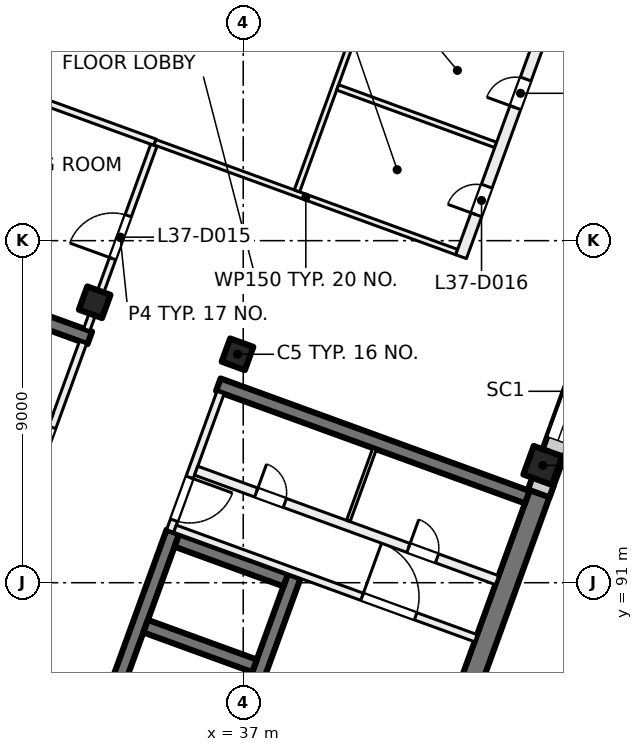
"""IFC4 building model, lengths in metres.
Left out: names, types, materials, properties, quantities, classifications, styles, units other than length and angle.
Written with IfcOpenShell. Run it as: python <this file> out.ifc"""

import sys

from ifc_helpers import new_model, si_unit, direction, frame, frame_2d, origin, origin_2d, place, context, subcontext, project, spatial, rectangle, extrude, element, fill, save


model = new_model("IFC4")
c1 = context("Model", 3, precision=1e-05, world=origin(), true_north=direction((0.0, 1.0)))
c2 = subcontext(c1, "Body", "Model", "MODEL_VIEW")
j1 = project(units=[si_unit("LENGTHUNIT", "METRE"), si_unit("PLANEANGLEUNIT", "RADIAN")], contexts=[c1])
p1 = place(None, origin())
s1 = spatial("IfcSite", under=j1, at=p1, CompositionType="ELEMENT")
p2 = place(p1, origin())
s2 = spatial("IfcBuilding", under=s1, at=p2, CompositionType="ELEMENT")
p3 = place(p2, frame((0.0, 0.0, 158.5)))
s3 = spatial("IfcBuildingStorey", under=s2, at=p3, CompositionType="ELEMENT", Elevation=158.5)
for number, where, z_axis, x_axis in (
    (1, (36.849, 97.011, 0.0), (0.0, 0.0, 1.0), (-0.342, -0.94, 0.0)),
    (2, (33.091, 98.379, 0.0), (0.0, 0.0, 1.0), (-0.342, -0.94, 0.0)),
):
    element("IfcColumn", number, at=place(p3, frame(where, z_axis=z_axis, x_axis=x_axis)), inside=s3, PredefinedType="COLUMN", context=c2, shape_type="SweptSolid", body=[
        extrude(rectangle(XDim=0.65, YDim=0.65, at=origin_2d()), origin(), (0.0, 0.0, 1.0), 4.0),
    ])
p4 = place(p3, frame((44.884, 94.087, 0.0), z_axis=(0.0, 0.0, 1.0), x_axis=(-0.342020143326, -0.939692620786, 0.0)))
e3 = element("IfcColumn", 3, at=p4, inside=s3, PredefinedType="COLUMN", context=c2, shape_type="SweptSolid", body=[
    extrude(rectangle(XDim=0.8, YDim=0.8, at=origin_2d()), origin(), (0.0, 0.0, 1.0), 4.0),
])
p5 = place(p3, frame((41.85, 85.241, 0.0), z_axis=(0.0, 0.0, 1.0), x_axis=(0.34201902012, 0.939693029598, 0.0)))
e4 = element("IfcWall", 4, at=p5, inside=s3, PredefinedType="SHEAR", context=c2, shape_type="SweptSolid", body=[
    extrude(rectangle(XDim=8.95, YDim=0.55, at=frame_2d((4.475, 0.0))), origin(), (0.0, 0.0, 1.0), 4.0),
])
p6 = place(p3, frame((30.967, 80.848, 0.0), z_axis=(0.0, 0.0, 1.0), x_axis=(0.34201563943, 0.939694260058, 0.0)))
e5 = element("IfcWall", 5, at=p6, inside=s3, PredefinedType="SHEAR", context=c2, shape_type="SweptSolid", body=[
    extrude(rectangle(XDim=12.225, YDim=0.35, at=frame_2d((6.113, 0.0))), origin(), (0.0, 0.0, 1.0), 4.0),
])
p7 = place(p6, frame((0.85, 0.0, 0.0)))
e6 = element("IfcOpeningElement", 6, at=p7, cuts=e5, PredefinedType="OPENING", context=c2, shape_type="SweptSolid", body=[
    extrude(rectangle(XDim=0.8, YDim=2.1, at=frame_2d((0.4, 1.05))), frame((0.0, 0.185, 0.0), z_axis=(0.0, -1.0, 0.0), x_axis=(1.0, 0.0, 0.0)), (0.0, 0.0, 1.0), 0.37),
])
p8 = place(p6, frame((5.65, 0.0, 0.0)))
e7 = element("IfcOpeningElement", 7, at=p8, cuts=e5, PredefinedType="OPENING", context=c2, shape_type="SweptSolid", body=[
    extrude(rectangle(XDim=0.8, YDim=2.1, at=frame_2d((0.4, 1.05))), frame((0.0, 0.185, 0.0), z_axis=(0.0, -1.0, 0.0), x_axis=(1.0, 0.0, 0.0)), (0.0, 0.0, 1.0), 0.37),
])
p9 = place(p3, frame((34.161, 79.685, 0.0), z_axis=(0.0, 0.0, 1.0), x_axis=(0.34201563943, 0.939694260058, 0.0)))
e8 = element("IfcWall", 8, at=p9, inside=s3, PredefinedType="SHEAR", context=c2, shape_type="SweptSolid", body=[
    extrude(rectangle(XDim=12.225, YDim=0.35, at=frame_2d((6.113, 0.0))), origin(), (0.0, 0.0, 1.0), 4.0),
])
for number, where, z_axis, x_axis in (
    (9, (37.298, 88.813, 0.0), (0.0, 0.0, 1.0), (-0.94, 0.342, 0.0)),
    (10, (38.118, 91.068, 0.0), (0.0, 0.0, 1.0), (-0.94, 0.342, 0.0)),
):
    element("IfcWall", number, at=place(p3, frame(where, z_axis=z_axis, x_axis=x_axis)), inside=s3, PredefinedType="SHEAR", context=c2, shape_type="SweptSolid", body=[
        extrude(rectangle(XDim=3.05, YDim=0.35, at=frame_2d((1.525, 0.0))), origin(), (0.0, 0.0, 1.0), 4.0),
    ])
p10 = place(p3, frame((44.473, 93.251, 0.0), z_axis=(0.0, 0.0, 1.0), x_axis=(-0.939692847377, 0.34201952077, 0.0)))
e11 = element("IfcWall", 11, at=p10, inside=s3, PredefinedType="SHEAR", context=c2, shape_type="SweptSolid", body=[
    extrude(rectangle(XDim=8.65, YDim=0.35, at=frame_2d((4.325, 0.0))), origin(), (0.0, 0.0, 1.0), 4.0),
])
p11 = place(p3, frame((32.962, 97.441, 0.0), z_axis=(0.0, 0.0, 1.0), x_axis=(-0.939689545667, 0.342028592028, 0.0)))
e12 = element("IfcWall", 12, at=p11, inside=s3, PredefinedType="SHEAR", context=c2, shape_type="SweptSolid", body=[
    extrude(rectangle(XDim=8.65, YDim=0.35, at=frame_2d((4.325, 0.0))), origin(), (0.0, 0.0, 1.0), 4.0),
])
p12 = place(p3, frame((52.212, 113.783, 0.0), z_axis=(0.0, 0.0, 1.0), x_axis=(-0.34202521188, -0.939690775968, 0.0)))
e13 = element("IfcWall", 13, at=p12, inside=s3, PredefinedType="SOLIDWALL", context=c2, shape_type="SweptSolid", body=[
    extrude(rectangle(XDim=21.745, YDim=0.6, at=frame_2d((10.873, 0.0))), origin(), (0.0, 0.0, 1.0), 3.625),
])
p13 = place(p12, frame((3.765, 0.0, 0.9)))
e14 = element("IfcOpeningElement", 14, at=p13, cuts=e13, PredefinedType="OPENING", context=c2, shape_type="SweptSolid", body=[
    extrude(rectangle(XDim=3.0, YDim=2.4, at=frame_2d((1.5, 1.2))), frame((0.0, 0.31, 0.0), z_axis=(0.0, -1.0, 0.0), x_axis=(1.0, 0.0, 0.0)), (0.0, 0.0, 1.0), 0.62),
])
p14 = place(p12, frame((8.265, 0.0, 0.9)))
e15 = element("IfcOpeningElement", 15, at=p14, cuts=e13, PredefinedType="OPENING", context=c2, shape_type="SweptSolid", body=[
    extrude(rectangle(XDim=3.0, YDim=2.4, at=frame_2d((1.5, 1.2))), frame((0.0, 0.31, 0.0), z_axis=(0.0, -1.0, 0.0), x_axis=(1.0, 0.0, 0.0)), (0.0, 0.0, 1.0), 0.62),
])
p15 = place(p12, frame((12.765, 0.0, 0.9)))
e16 = element("IfcOpeningElement", 16, at=p15, cuts=e13, PredefinedType="OPENING", context=c2, shape_type="SweptSolid", body=[
    extrude(rectangle(XDim=3.0, YDim=2.4, at=frame_2d((1.5, 1.2))), frame((0.0, 0.31, 0.0), z_axis=(0.0, -1.0, 0.0), x_axis=(1.0, 0.0, 0.0)), (0.0, 0.0, 1.0), 0.62),
])
p16 = place(p12, frame((17.265, 0.0, 0.9)))
e17 = element("IfcOpeningElement", 17, at=p16, cuts=e13, PredefinedType="OPENING", context=c2, shape_type="SweptSolid", body=[
    extrude(rectangle(XDim=3.0, YDim=2.4, at=frame_2d((1.5, 1.2))), frame((0.0, 0.31, 0.0), z_axis=(0.0, -1.0, 0.0), x_axis=(1.0, 0.0, 0.0)), (0.0, 0.0, 1.0), 0.62),
])
p17 = place(p3, frame((24.666, 100.669, 0.0), z_axis=(0.0, 0.0, 1.0), x_axis=(0.34201964167, 0.939692803373, 0.0)))
e18 = element("IfcWall", 18, at=p17, inside=s3, PredefinedType="SOLIDWALL", context=c2, shape_type="SweptSolid", body=[
    extrude(rectangle(XDim=32.884, YDim=0.6, at=frame_2d((16.442, 0.0))), origin(), (0.0, 0.0, 1.0), 3.625),
])
p18 = place(p17, frame((1.48, 0.0, 0.9)))
e19 = element("IfcOpeningElement", 19, at=p18, cuts=e18, PredefinedType="OPENING", context=c2, shape_type="SweptSolid", body=[
    extrude(rectangle(XDim=3.0, YDim=2.4, at=frame_2d((1.5, 1.2))), frame((0.0, 0.31, 0.0), z_axis=(0.0, -1.0, 0.0), x_axis=(1.0, 0.0, 0.0)), (0.0, 0.0, 1.0), 0.62),
])
p19 = place(p17, frame((5.98, 0.0, 0.9)))
e20 = element("IfcOpeningElement", 20, at=p19, cuts=e18, PredefinedType="OPENING", context=c2, shape_type="SweptSolid", body=[
    extrude(rectangle(XDim=3.0, YDim=2.4, at=frame_2d((1.5, 1.2))), frame((0.0, 0.31, 0.0), z_axis=(0.0, -1.0, 0.0), x_axis=(1.0, 0.0, 0.0)), (0.0, 0.0, 1.0), 0.62),
])
p20 = place(p17, frame((10.48, 0.0, 0.9)))
e21 = element("IfcOpeningElement", 21, at=p20, cuts=e18, PredefinedType="OPENING", context=c2, shape_type="SweptSolid", body=[
    extrude(rectangle(XDim=3.0, YDim=2.4, at=frame_2d((1.5, 1.2))), frame((0.0, 0.31, 0.0), z_axis=(0.0, -1.0, 0.0), x_axis=(1.0, 0.0, 0.0)), (0.0, 0.0, 1.0), 0.62),
])
p21 = place(p17, frame((14.98, 0.0, 0.9)))
e22 = element("IfcOpeningElement", 22, at=p21, cuts=e18, PredefinedType="OPENING", context=c2, shape_type="SweptSolid", body=[
    extrude(rectangle(XDim=3.0, YDim=2.4, at=frame_2d((1.5, 1.2))), frame((0.0, 0.31, 0.0), z_axis=(0.0, -1.0, 0.0), x_axis=(1.0, 0.0, 0.0)), (0.0, 0.0, 1.0), 0.62),
])
p22 = place(p17, frame((19.48, 0.0, 0.9)))
e23 = element("IfcOpeningElement", 23, at=p22, cuts=e18, PredefinedType="OPENING", context=c2, shape_type="SweptSolid", body=[
    extrude(rectangle(XDim=3.0, YDim=2.4, at=frame_2d((1.5, 1.2))), frame((0.0, 0.31, 0.0), z_axis=(0.0, -1.0, 0.0), x_axis=(1.0, 0.0, 0.0)), (0.0, 0.0, 1.0), 0.62),
])
p23 = place(p17, frame((23.98, 0.0, 0.9)))
e24 = element("IfcOpeningElement", 24, at=p23, cuts=e18, PredefinedType="OPENING", context=c2, shape_type="SweptSolid", body=[
    extrude(rectangle(XDim=3.0, YDim=2.4, at=frame_2d((1.5, 1.2))), frame((0.0, 0.31, 0.0), z_axis=(0.0, -1.0, 0.0), x_axis=(1.0, 0.0, 0.0)), (0.0, 0.0, 1.0), 0.62),
])
p24 = place(p17, frame((28.48, 0.0, 0.9)))
e25 = element("IfcOpeningElement", 25, at=p24, cuts=e18, PredefinedType="OPENING", context=c2, shape_type="SweptSolid", body=[
    extrude(rectangle(XDim=3.0, YDim=2.4, at=frame_2d((1.5, 1.2))), frame((0.0, 0.31, 0.0), z_axis=(0.0, -1.0, 0.0), x_axis=(1.0, 0.0, 0.0)), (0.0, 0.0, 1.0), 0.62),
])
p25 = place(p3, frame((31.459, 93.678, 0.0), z_axis=(0.0, 0.0, 1.0), x_axis=(0.341985870128, 0.939705094502, 0.0)))
e26 = element("IfcWall", 26, at=p25, inside=s3, PredefinedType="PARTITIONING", context=c2, shape_type="SweptSolid", body=[
    extrude(rectangle(XDim=3.875, YDim=0.2, at=frame_2d((1.938, 0.0))), origin(), (0.0, 0.0, 1.0), 3.625),
])
p26 = place(p25, frame((0.3, 0.0, 0.0)))
e27 = element("IfcOpeningElement", 27, at=p26, cuts=e26, PredefinedType="OPENING", context=c2, shape_type="SweptSolid", body=[
    extrude(rectangle(XDim=1.2, YDim=2.1, at=frame_2d((0.6, 1.05))), frame((0.0, 0.11, 0.0), z_axis=(0.0, -1.0, 0.0), x_axis=(1.0, 0.0, 0.0)), (0.0, 0.0, 1.0), 0.22),
])
p27 = place(p3, frame((24.039, 98.215, 0.0), z_axis=(0.0, 0.0, 1.0), x_axis=(0.939687617333, -0.342033889887, 0.0)))
e28 = element("IfcWall", 28, at=p27, inside=s3, PredefinedType="PARTITIONING", context=c2, shape_type="SweptSolid", body=[
    extrude(rectangle(XDim=8.425, YDim=0.25, at=frame_2d((4.212, 0.0))), origin(), (0.0, 0.0, 1.0), 3.625),
])
p28 = place(p27, frame((5.242, 0.0, 0.0)))
e29 = element("IfcOpeningElement", 29, at=p28, cuts=e28, PredefinedType="OPENING", context=c2, shape_type="SweptSolid", body=[
    extrude(rectangle(XDim=0.8, YDim=2.1, at=frame_2d((0.4, 1.05))), frame((0.0, 0.135, 0.0), z_axis=(0.0, -1.0, 0.0), x_axis=(1.0, 0.0, 0.0)), (0.0, 0.0, 1.0), 0.27),
])
p29 = place(p27, frame((0.98, 0.0, 0.0)))
e30 = element("IfcOpeningElement", 30, at=p29, cuts=e28, PredefinedType="OPENING", context=c2, shape_type="SweptSolid", body=[
    extrude(rectangle(XDim=0.8, YDim=2.1, at=frame_2d((0.4, 1.05))), frame((0.0, 0.135, 0.0), z_axis=(0.0, -1.0, 0.0), x_axis=(1.0, 0.0, 0.0)), (0.0, 0.0, 1.0), 0.27),
])
p30 = place(p3, frame((36.403, 96.003, 0.0), z_axis=(0.0, 0.0, 1.0), x_axis=(-0.342041503764, -0.939684845947, 0.0)))
e31 = element("IfcWall", 31, at=p30, inside=s3, PredefinedType="PARTITIONING", context=c2, shape_type="SweptSolid", body=[
    extrude(rectangle(XDim=3.875, YDim=0.2, at=frame_2d((1.938, 0.0))), origin(), (0.0, 0.0, 1.0), 3.625),
])
p31 = place(p30, frame((2.375, 0.0, 0.0)))
e32 = element("IfcOpeningElement", 32, at=p31, cuts=e31, PredefinedType="OPENING", context=c2, shape_type="SweptSolid", body=[
    extrude(rectangle(XDim=1.2, YDim=2.1, at=frame_2d((0.6, 1.05))), frame((0.0, 0.11, 0.0), z_axis=(0.0, -1.0, 0.0), x_axis=(1.0, 0.0, 0.0)), (0.0, 0.0, 1.0), 0.22),
])
p32 = place(p3, frame((35.205, 92.421, 0.0), z_axis=(0.0, 0.0, 1.0), x_axis=(0.939691007314, -0.342024576271, 0.0)))
e33 = element("IfcWall", 33, at=p32, inside=s3, PredefinedType="PARTITIONING", context=c2, shape_type="SweptSolid", body=[
    extrude(rectangle(XDim=8.425, YDim=0.2, at=frame_2d((4.212, 0.0))), origin(), (0.0, 0.0, 1.0), 3.625),
])
p33 = place(p32, frame((5.238, 0.0, 0.0)))
e34 = element("IfcOpeningElement", 34, at=p33, cuts=e33, PredefinedType="OPENING", context=c2, shape_type="SweptSolid", body=[
    extrude(rectangle(XDim=1.5, YDim=2.1, at=frame_2d((0.75, 1.05))), frame((0.0, 0.11, 0.0), z_axis=(0.0, -1.0, 0.0), x_axis=(1.0, 0.0, 0.0)), (0.0, 0.0, 1.0), 0.22),
])
p34 = place(p3, frame((35.761, 93.948, 0.0), z_axis=(0.0, 0.0, 1.0), x_axis=(0.93969693093, -0.342008301071, 0.0)))
e35 = element("IfcWall", 35, at=p34, inside=s3, PredefinedType="PARTITIONING", context=c2, shape_type="SweptSolid", body=[
    extrude(rectangle(XDim=8.425, YDim=0.25, at=frame_2d((4.212, 0.0))), origin(), (0.0, 0.0, 1.0), 3.625),
])
p35 = place(p34, frame((1.683, 0.0, 0.0)))
e36 = element("IfcOpeningElement", 36, at=p35, cuts=e35, PredefinedType="OPENING", context=c2, shape_type="SweptSolid", body=[
    extrude(rectangle(XDim=0.8, YDim=2.1, at=frame_2d((0.4, 1.05))), frame((0.0, 0.135, 0.0), z_axis=(0.0, -1.0, 0.0), x_axis=(1.0, 0.0, 0.0)), (0.0, 0.0, 1.0), 0.27),
])
p36 = place(p34, frame((5.945, 0.0, 0.0)))
e37 = element("IfcOpeningElement", 37, at=p36, cuts=e35, PredefinedType="OPENING", context=c2, shape_type="SweptSolid", body=[
    extrude(rectangle(XDim=0.8, YDim=2.1, at=frame_2d((0.4, 1.05))), frame((0.0, 0.135, 0.0), z_axis=(0.0, -1.0, 0.0), x_axis=(1.0, 0.0, 0.0)), (0.0, 0.0, 1.0), 0.27),
])
p37 = place(p3, frame((40.457, 94.527, 0.0), z_axis=(0.0, 0.0, 1.0), x_axis=(-0.342043138314, -0.939684250976, 0.0)))
e38 = element("IfcWall", 38, at=p37, inside=s3, PredefinedType="PARTITIONING", context=c2, shape_type="SweptSolid", body=[
    extrude(rectangle(XDim=2.025, YDim=0.1, at=frame_2d((1.012, 0.0))), origin(), (0.0, 0.0, 1.0), 3.625),
])
p38 = place(p3, frame((30.95, 103.946, 0.0), z_axis=(0.0, 0.0, 1.0), x_axis=(0.939739492658, -0.341891336449, 0.0)))
e39 = element("IfcWall", 39, at=p38, inside=s3, PredefinedType="PARTITIONING", context=c2, shape_type="SweptSolid", body=[
    extrude(rectangle(XDim=3.966, YDim=0.175, at=frame_2d((1.983, 0.0))), origin(), (0.0, 0.0, 1.0), 3.625),
])
p39 = place(p3, frame((32.436, 108.274, 0.0), z_axis=(0.0, 0.0, 1.0), x_axis=(-0.342145890874, -0.939646842893, 0.0)))
e40 = element("IfcWall", 40, at=p39, inside=s3, PredefinedType="PARTITIONING", context=c2, shape_type="SweptSolid", body=[
    extrude(rectangle(XDim=4.574, YDim=0.15, at=frame_2d((2.287, 0.0))), origin(), (0.0, 0.0, 1.0), 3.625),
])
p40 = place(p39, frame((1.824, 0.0, 0.0)))
e41 = element("IfcOpeningElement", 41, at=p40, cuts=e40, PredefinedType="OPENING", context=c2, shape_type="SweptSolid", body=[
    extrude(rectangle(XDim=1.0, YDim=2.1, at=frame_2d((0.5, 1.05))), frame((0.0, 0.085, 0.0), z_axis=(0.0, -1.0, 0.0), x_axis=(1.0, 0.0, 0.0)), (0.0, 0.0, 1.0), 0.17),
])
p41 = place(p3, frame((32.881, 97.657, 0.0), z_axis=(0.0, 0.0, 1.0), x_axis=(0.342058204353, 0.939678766832, 0.0)))
e42 = element("IfcWall", 42, at=p41, inside=s3, PredefinedType="PARTITIONING", context=c2, shape_type="SweptSolid", body=[
    extrude(rectangle(XDim=5.163, YDim=0.175, at=frame_2d((2.581, 0.0))), origin(), (0.0, 0.0, 1.0), 3.625),
])
p42 = place(p41, frame((1.991, 0.0, 0.0)))
e43 = element("IfcOpeningElement", 43, at=p42, cuts=e42, PredefinedType="OPENING", context=c2, shape_type="SweptSolid", body=[
    extrude(rectangle(XDim=1.2, YDim=2.1, at=frame_2d((0.6, 1.05))), frame((0.0, 0.097, 0.0), z_axis=(0.0, -1.0, 0.0), x_axis=(1.0, 0.0, 0.0)), (0.0, 0.0, 1.0), 0.195),
])
p43 = place(p3, frame((34.677, 102.59, 0.0), z_axis=(0.0, 0.0, 1.0), x_axis=(0.939683705252, -0.342044637561, 0.0)))
e44 = element("IfcWall", 44, at=p43, inside=s3, PredefinedType="PARTITIONING", context=c2, shape_type="SweptSolid", body=[
    extrude(rectangle(XDim=8.45, YDim=0.15, at=frame_2d((4.225, 0.0))), origin(), (0.0, 0.0, 1.0), 3.625),
])
p44 = place(p3, frame((38.414, 101.309, 0.0), z_axis=(0.0, 0.0, 1.0), x_axis=(0.34186876189, 0.939747705315, 0.0)))
e45 = element("IfcWall", 45, at=p44, inside=s3, PredefinedType="PARTITIONING", context=c2, shape_type="SweptSolid", body=[
    extrude(rectangle(XDim=5.926, YDim=0.15, at=frame_2d((2.963, 0.0))), origin(), (0.0, 0.0, 1.0), 3.625),
])
p45 = place(p3, frame((39.484, 104.033, 0.0), z_axis=(0.0, 0.0, 1.0), x_axis=(0.939685474739, -0.342039776289, 0.0)))
e46 = element("IfcWall", 46, at=p45, inside=s3, PredefinedType="PARTITIONING", context=c2, shape_type="SweptSolid", body=[
    extrude(rectangle(XDim=4.426, YDim=0.15, at=frame_2d((2.213, 0.0))), origin(), (0.0, 0.0, 1.0), 3.625),
])
p46 = place(p3, frame((42.732, 99.579, 0.0), z_axis=(0.0, 0.0, 1.0), x_axis=(0.342036000593, 0.939686849061, 0.0)))
e47 = element("IfcWall", 47, at=p46, inside=s3, PredefinedType="PARTITIONING", context=c2, shape_type="SweptSolid", body=[
    extrude(rectangle(XDim=23.018, YDim=0.3, at=frame_2d((11.509, 0.0))), origin(), (0.0, 0.0, 1.0), 3.625),
])
p47 = place(p46, frame((1.175, 0.0, 0.0)))
e48 = element("IfcOpeningElement", 48, at=p47, cuts=e47, PredefinedType="OPENING", context=c2, shape_type="SweptSolid", body=[
    extrude(rectangle(XDim=0.8, YDim=2.1, at=frame_2d((0.4, 1.05))), frame((0.0, 0.16, 0.0), z_axis=(0.0, -1.0, 0.0), x_axis=(1.0, 0.0, 0.0)), (0.0, 0.0, 1.0), 0.32),
])
p48 = place(p46, frame((4.175, 0.0, 0.0)))
e49 = element("IfcOpeningElement", 49, at=p48, cuts=e47, PredefinedType="OPENING", context=c2, shape_type="SweptSolid", body=[
    extrude(rectangle(XDim=0.8, YDim=2.1, at=frame_2d((0.4, 1.05))), frame((0.0, 0.16, 0.0), z_axis=(0.0, -1.0, 0.0), x_axis=(1.0, 0.0, 0.0)), (0.0, 0.0, 1.0), 0.32),
])
p49 = place(p46, frame((7.725, 0.0, 0.0)))
e50 = element("IfcOpeningElement", 50, at=p49, cuts=e47, PredefinedType="OPENING", context=c2, shape_type="SweptSolid", body=[
    extrude(rectangle(XDim=1.2, YDim=2.1, at=frame_2d((0.6, 1.05))), frame((0.0, 0.16, 0.0), z_axis=(0.0, -1.0, 0.0), x_axis=(1.0, 0.0, 0.0)), (0.0, 0.0, 1.0), 0.32),
])
p50 = place(p46, frame((15.675, 0.0, 0.0)))
e51 = element("IfcOpeningElement", 51, at=p50, cuts=e47, PredefinedType="OPENING", context=c2, shape_type="SweptSolid", body=[
    extrude(rectangle(XDim=1.8, YDim=2.1, at=frame_2d((0.9, 1.05))), frame((0.0, 0.16, 0.0), z_axis=(0.0, -1.0, 0.0), x_axis=(1.0, 0.0, 0.0)), (0.0, 0.0, 1.0), 0.32),
])
p51 = place(p16, origin())
e52 = element("IfcWindow", 52, at=p51, inside=s3, PartitioningType="SINGLE_PANEL", PredefinedType="WINDOW", context=c2, shape_type="SweptSolid", body=[
    extrude(rectangle(XDim=3.0, YDim=2.4, at=frame_2d((1.5, 1.2))), frame((0.0, 0.03, 0.0), z_axis=(0.0, -1.0, 0.0), x_axis=(1.0, 0.0, 0.0)), (0.0, 0.0, 1.0), 0.06),
])
fill(e17, e52)
p52 = place(p26, origin())
e53 = element("IfcDoor", 53, at=p52, inside=s3, OperationType="DOUBLE_DOOR_SINGLE_SWING", PredefinedType="DOOR", context=c2, shape_type="SweptSolid", body=[
    extrude(rectangle(XDim=1.2, YDim=2.1, at=frame_2d((0.6, 1.05))), frame((0.0, 0.025, 0.0), z_axis=(0.0, -1.0, 0.0), x_axis=(1.0, 0.0, 0.0)), (0.0, 0.0, 1.0), 0.05),
])
fill(e27, e53)
p53 = place(p31, origin())
e54 = element("IfcDoor", 54, at=p53, inside=s3, OperationType="DOUBLE_DOOR_SINGLE_SWING", PredefinedType="DOOR", context=c2, shape_type="SweptSolid", body=[
    extrude(rectangle(XDim=1.2, YDim=2.1, at=frame_2d((0.6, 1.05))), frame((0.0, 0.025, 0.0), z_axis=(0.0, -1.0, 0.0), x_axis=(1.0, 0.0, 0.0)), (0.0, 0.0, 1.0), 0.05),
])
fill(e32, e54)
p54 = place(p33, origin())
e55 = element("IfcDoor", 55, at=p54, inside=s3, OperationType="DOUBLE_DOOR_SINGLE_SWING", PredefinedType="DOOR", context=c2, shape_type="SweptSolid", body=[
    extrude(rectangle(XDim=1.5, YDim=2.1, at=frame_2d((0.75, 1.05))), frame((0.0, 0.025, 0.0), z_axis=(0.0, -1.0, 0.0), x_axis=(1.0, 0.0, 0.0)), (0.0, 0.0, 1.0), 0.05),
])
fill(e34, e55)
p55 = place(p35, origin())
e56 = element("IfcDoor", 56, at=p55, inside=s3, OperationType="SINGLE_SWING_RIGHT", PredefinedType="DOOR", context=c2, shape_type="SweptSolid", body=[
    extrude(rectangle(XDim=0.8, YDim=2.1, at=frame_2d((0.4, 1.05))), frame((0.0, 0.025, 0.0), z_axis=(0.0, -1.0, 0.0), x_axis=(1.0, 0.0, 0.0)), (0.0, 0.0, 1.0), 0.05),
])
fill(e36, e56)
p56 = place(p36, origin())
e57 = element("IfcDoor", 57, at=p56, inside=s3, OperationType="SINGLE_SWING_LEFT", PredefinedType="DOOR", context=c2, shape_type="SweptSolid", body=[
    extrude(rectangle(XDim=0.8, YDim=2.1, at=frame_2d((0.4, 1.05))), frame((0.0, 0.025, 0.0), z_axis=(0.0, -1.0, 0.0), x_axis=(1.0, 0.0, 0.0)), (0.0, 0.0, 1.0), 0.05),
])
fill(e37, e57)
p57 = place(p42, origin())
e58 = element("IfcDoor", 58, at=p57, inside=s3, OperationType="DOUBLE_DOOR_SINGLE_SWING", PredefinedType="DOOR", context=c2, shape_type="SweptSolid", body=[
    extrude(rectangle(XDim=1.2, YDim=2.1, at=frame_2d((0.6, 1.05))), frame((0.0, 0.025, 0.0), z_axis=(0.0, -1.0, 0.0), x_axis=(1.0, 0.0, 0.0)), (0.0, 0.0, 1.0), 0.05),
])
fill(e43, e58)
p58 = place(p47, origin())
e59 = element("IfcDoor", 59, at=p58, inside=s3, OperationType="SINGLE_SWING_RIGHT", PredefinedType="DOOR", context=c2, shape_type="SweptSolid", body=[
    extrude(rectangle(XDim=0.8, YDim=2.1, at=frame_2d((0.4, 1.05))), frame((0.0, 0.025, 0.0), z_axis=(0.0, -1.0, 0.0), x_axis=(1.0, 0.0, 0.0)), (0.0, 0.0, 1.0), 0.05),
])
fill(e48, e59)
p59 = place(p48, origin())
e60 = element("IfcDoor", 60, at=p59, inside=s3, OperationType="SINGLE_SWING_LEFT", PredefinedType="DOOR", context=c2, shape_type="SweptSolid", body=[
    extrude(rectangle(XDim=0.8, YDim=2.1, at=frame_2d((0.4, 1.05))), frame((0.0, 0.025, 0.0), z_axis=(0.0, -1.0, 0.0), x_axis=(1.0, 0.0, 0.0)), (0.0, 0.0, 1.0), 0.05),
])
fill(e49, e60)
save(model, sys.argv[1])
